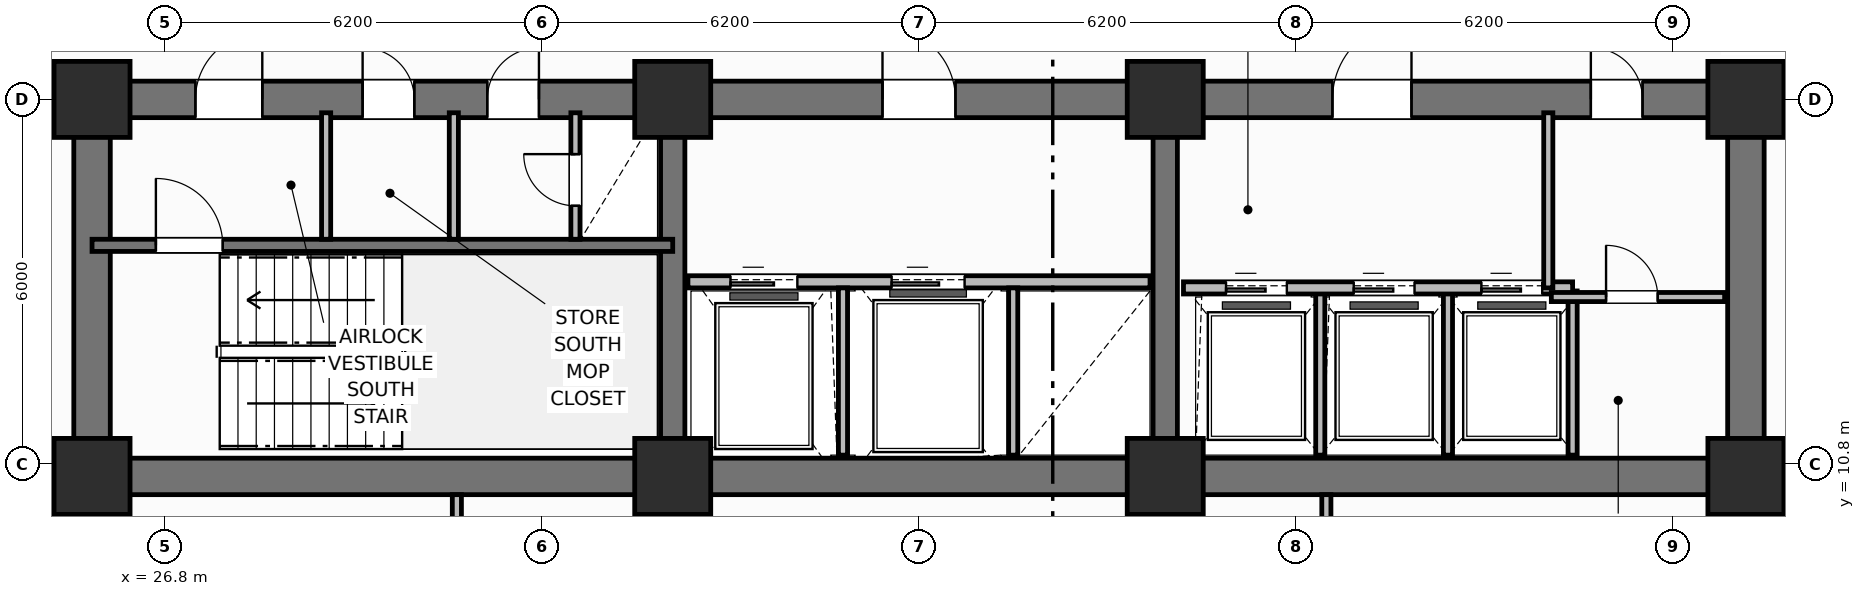
"""IFC4 building model, lengths in metres.
Left out: names, types, materials, properties, quantities, classifications, styles, units other than length and angle.
Written with IfcOpenShell. Run it as: python <this file> out.ifc"""

import sys

from ifc_helpers import new_model, si_unit, direction, frame, frame_2d, origin, origin_2d, place, context, subcontext, project, spatial, rectangle, extrude, element, fill, save


model = new_model("IFC4")
c1 = context("Model", 3, precision=1e-05, world=origin(), true_north=direction((0.0, 1.0)))
c2 = subcontext(c1, "Body", "Model", "MODEL_VIEW")
j1 = project(units=[si_unit("LENGTHUNIT", "METRE"), si_unit("PLANEANGLEUNIT", "RADIAN")], contexts=[c1])
p1 = place(None, origin())
s1 = spatial("IfcSite", under=j1, at=p1, CompositionType="ELEMENT")
p2 = place(p1, origin())
s2 = spatial("IfcBuilding", under=s1, at=p2, CompositionType="ELEMENT")
p3 = place(p2, frame((0.0, 0.0, 69.5)))
s3 = spatial("IfcBuildingStorey", under=s2, at=p3, CompositionType="ELEMENT", Elevation=69.5)
p4 = place(p3, frame((52.8, 10.6, 0.0), z_axis=(0.0, 0.0, 1.0), x_axis=(-1.0, 0.0, 0.0)))
e1 = element("IfcWall", 1, at=p4, inside=s3, PredefinedType="SHEAR", context=c2, shape_type="SweptSolid", body=[
    extrude(rectangle(XDim=27.2, YDim=0.6, at=frame_2d((13.6, 0.0))), origin(), (0.0, 0.0, 1.0), 3.7),
])
for number, where, z_axis, x_axis in (
    (2, (25.6, 10.9, 0.0), (0.0, 0.0, 1.0), (0.0, 1.0, 0.0)),
    (3, (52.8, 10.9, 0.0), (0.0, 0.0, 1.0), (0.0, 1.0, 0.0)),
):
    element("IfcWall", number, at=place(p3, frame(where, z_axis=z_axis, x_axis=x_axis)), inside=s3, PredefinedType="SHEAR", context=c2, shape_type="SweptSolid", body=[
        extrude(rectangle(XDim=5.6, YDim=0.6, at=frame_2d((2.8, 0.0))), origin(), (0.0, 0.0, 1.0), 3.7),
    ])
p5 = place(p3, frame((25.6, 16.8, 0.0), z_axis=(0.0, 0.0, 1.0), x_axis=(1.0, 0.0, 0.0)))
e4 = element("IfcWall", 4, at=p5, inside=s3, PredefinedType="SHEAR", context=c2, shape_type="SweptSolid", body=[
    extrude(rectangle(XDim=27.2, YDim=0.6, at=frame_2d((13.6, 0.0))), origin(), (0.0, 0.0, 1.0), 3.7),
])
p6 = place(p5, frame((1.7, 0.0, 0.0)))
e5 = element("IfcOpeningElement", 5, at=p6, cuts=e4, PredefinedType="OPENING", context=c2, shape_type="SweptSolid", body=[
    extrude(rectangle(XDim=1.1, YDim=2.15, at=frame_2d((0.55, 1.075))), frame((0.0, 0.31, 0.0), z_axis=(0.0, -1.0, 0.0), x_axis=(1.0, 0.0, 0.0)), (0.0, 0.0, 1.0), 0.62),
])
p7 = place(p5, frame((4.45, 0.0, 0.0)))
e6 = element("IfcOpeningElement", 6, at=p7, cuts=e4, PredefinedType="OPENING", context=c2, shape_type="SweptSolid", body=[
    extrude(rectangle(XDim=0.85, YDim=2.1, at=frame_2d((0.425, 1.05))), frame((0.0, 0.31, 0.0), z_axis=(0.0, -1.0, 0.0), x_axis=(1.0, 0.0, 0.0)), (0.0, 0.0, 1.0), 0.62),
])
p8 = place(p5, frame((6.5, 0.0, 0.0)))
e7 = element("IfcOpeningElement", 7, at=p8, cuts=e4, PredefinedType="OPENING", context=c2, shape_type="SweptSolid", body=[
    extrude(rectangle(XDim=0.85, YDim=2.1, at=frame_2d((0.425, 1.05))), frame((0.0, 0.31, 0.0), z_axis=(0.0, -1.0, 0.0), x_axis=(1.0, 0.0, 0.0)), (0.0, 0.0, 1.0), 0.62),
])
p9 = place(p5, frame((13.0, 0.0, 0.0)))
e8 = element("IfcOpeningElement", 8, at=p9, cuts=e4, PredefinedType="OPENING", context=c2, shape_type="SweptSolid", body=[
    extrude(rectangle(XDim=1.2, YDim=2.15, at=frame_2d((0.6, 1.075))), frame((0.0, 0.31, 0.0), z_axis=(0.0, -1.0, 0.0), x_axis=(1.0, 0.0, 0.0)), (0.0, 0.0, 1.0), 0.62),
])
p10 = place(p5, frame((20.4, 0.0, 0.0)))
e9 = element("IfcOpeningElement", 9, at=p10, cuts=e4, PredefinedType="OPENING", context=c2, shape_type="SweptSolid", body=[
    extrude(rectangle(XDim=1.3, YDim=2.2, at=frame_2d((0.65, 1.1))), frame((0.0, 0.31, 0.0), z_axis=(0.0, -1.0, 0.0), x_axis=(1.0, 0.0, 0.0)), (0.0, 0.0, 1.0), 0.62),
])
p11 = place(p5, frame((24.65, 0.0, 0.0)))
e10 = element("IfcOpeningElement", 10, at=p11, cuts=e4, PredefinedType="OPENING", context=c2, shape_type="SweptSolid", body=[
    extrude(rectangle(XDim=0.85, YDim=2.1, at=frame_2d((0.425, 1.05))), frame((0.0, 0.31, 0.0), z_axis=(0.0, -1.0, 0.0), x_axis=(1.0, 0.0, 0.0)), (0.0, 0.0, 1.0), 0.62),
])
for number, where, z_axis, x_axis in (
    (11, (35.15, 10.9, 0.0), (0.0, 0.0, 1.0), (0.0, 1.0, 0.0)),
    (12, (43.25, 10.9, 0.0), (0.0, 0.0, 1.0), (0.0, 1.0, 0.0)),
):
    element("IfcWall", number, at=place(p3, frame(where, z_axis=z_axis, x_axis=x_axis)), inside=s3, PredefinedType="SHEAR", context=c2, shape_type="SweptSolid", body=[
        extrude(rectangle(XDim=5.6, YDim=0.4, at=frame_2d((2.8, 0.0))), origin(), (0.0, 0.0, 1.0), 3.7),
    ])
for number, where, z_axis, x_axis in (
    (13, (25.6, 10.6, 0.0), (0.0, 0.0, 1.0), (1.0, 0.0, 0.0)),
    (14, (25.6, 16.8, 0.0), (0.0, 0.0, 1.0), (1.0, 0.0, 0.0)),
    (15, (35.15, 10.6, 0.0), (0.0, 0.0, 1.0), (1.0, 0.0, 0.0)),
    (16, (35.15, 16.8, 0.0), (0.0, 0.0, 1.0), (1.0, 0.0, 0.0)),
    (17, (43.25, 10.6, 0.0), (0.0, 0.0, 1.0), (1.0, 0.0, 0.0)),
    (18, (43.25, 16.8, 0.0), (0.0, 0.0, 1.0), (1.0, 0.0, 0.0)),
    (19, (52.8, 10.6, 0.0), (0.0, 0.0, 1.0), (1.0, 0.0, 0.0)),
    (20, (52.8, 16.8, 0.0), (0.0, 0.0, 1.0), (1.0, 0.0, 0.0)),
):
    element("IfcColumn", number, at=place(p3, frame(where, z_axis=z_axis, x_axis=x_axis)), inside=s3, PredefinedType="COLUMN", context=c2, shape_type="SweptSolid", body=[
        extrude(rectangle(XDim=1.25, YDim=1.25, at=origin_2d()), origin(), (0.0, 0.0, 1.0), 3.7),
    ])
p12 = place(p3, frame((25.6, 14.4, 0.0), z_axis=(0.0, 0.0, 1.0), x_axis=(1.0, 0.0, 0.0)))
e21 = element("IfcWall", 21, at=p12, inside=s3, PredefinedType="SHEAR", context=c2, shape_type="SweptSolid", body=[
    extrude(rectangle(XDim=9.55, YDim=0.2, at=frame_2d((4.775, 0.0))), origin(), (0.0, 0.0, 1.0), 3.7),
])
p13 = place(p12, frame((1.05, 0.0, 0.0)))
e22 = element("IfcOpeningElement", 22, at=p13, cuts=e21, PredefinedType="OPENING", context=c2, shape_type="SweptSolid", body=[
    extrude(rectangle(XDim=1.1, YDim=2.15, at=frame_2d((0.55, 1.075))), frame((0.0, 0.11, 0.0), z_axis=(0.0, -1.0, 0.0), x_axis=(1.0, 0.0, 0.0)), (0.0, 0.0, 1.0), 0.22),
])
for number, where, z_axis, x_axis in (
    (23, (29.45, 14.5, 0.0), (0.0, 0.0, 1.0), (0.0, 1.0, 0.0)),
    (24, (31.55, 14.5, 0.0), (0.0, 0.0, 1.0), (0.0, 1.0, 0.0)),
):
    element("IfcWall", number, at=place(p3, frame(where, z_axis=z_axis, x_axis=x_axis)), inside=s3, PredefinedType="PARTITIONING", context=c2, shape_type="SweptSolid", body=[
        extrude(rectangle(XDim=2.08, YDim=0.15, at=frame_2d((1.04, 0.0))), origin(), (0.0, 0.0, 1.0), 2.53),
    ])
p14 = place(p3, frame((33.55, 14.5, 0.0), z_axis=(0.0, 0.0, 1.0), x_axis=(0.0, 1.0, 0.0)))
e25 = element("IfcWall", 25, at=p14, inside=s3, PredefinedType="PARTITIONING", context=c2, shape_type="SweptSolid", body=[
    extrude(rectangle(XDim=2.08, YDim=0.15, at=frame_2d((1.04, 0.0))), origin(), (0.0, 0.0, 1.0), 2.53),
])
p15 = place(p14, frame((0.55, 0.0, 0.0)))
e26 = element("IfcOpeningElement", 26, at=p15, cuts=e25, PredefinedType="OPENING", context=c2, shape_type="SweptSolid", body=[
    extrude(rectangle(XDim=0.85, YDim=2.05, at=frame_2d((0.425, 1.025))), frame((0.0, 0.085, 0.0), z_axis=(0.0, -1.0, 0.0), x_axis=(1.0, 0.0, 0.0)), (0.0, 0.0, 1.0), 0.17),
])
p16 = place(p3, frame((35.4, 13.8, 0.0), z_axis=(0.0, 0.0, 1.0), x_axis=(1.0, 0.0, 0.0)))
e27 = element("IfcWall", 27, at=p16, inside=s3, PredefinedType="PARTITIONING", context=c2, shape_type="SweptSolid", body=[
    extrude(rectangle(XDim=7.6, YDim=0.2, at=frame_2d((3.8, 0.0))), origin(), (0.0, 0.0, 1.0), 2.3),
])
p17 = place(p16, frame((0.7, 0.0, 0.0)))
e28 = element("IfcOpeningElement", 28, at=p17, cuts=e27, PredefinedType="OPENING", context=c2, shape_type="SweptSolid", body=[
    extrude(rectangle(XDim=1.1, YDim=2.15, at=frame_2d((0.55, 1.075))), frame((0.0, 0.11, 0.0), z_axis=(0.0, -1.0, 0.0), x_axis=(1.0, 0.0, 0.0)), (0.0, 0.0, 1.0), 0.22),
])
p18 = place(p16, frame((3.35, 0.0, 0.0)))
e29 = element("IfcOpeningElement", 29, at=p18, cuts=e27, PredefinedType="OPENING", context=c2, shape_type="SweptSolid", body=[
    extrude(rectangle(XDim=1.2, YDim=2.15, at=frame_2d((0.6, 1.075))), frame((0.0, 0.11, 0.0), z_axis=(0.0, -1.0, 0.0), x_axis=(1.0, 0.0, 0.0)), (0.0, 0.0, 1.0), 0.22),
])
for number, where, z_axis, x_axis in (
    (30, (37.95, 10.95, 0.0), (0.0, 0.0, 1.0), (0.0, 1.0, 0.0)),
    (31, (40.75, 10.95, 0.0), (0.0, 0.0, 1.0), (0.0, 1.0, 0.0)),
):
    element("IfcWall", number, at=place(p3, frame(where, z_axis=z_axis, x_axis=x_axis)), inside=s3, PredefinedType="PARTITIONING", context=c2, shape_type="SweptSolid", body=[
        extrude(rectangle(XDim=2.75, YDim=0.15, at=frame_2d((1.375, 0.0))), origin(), (0.0, 0.0, 1.0), 2.53),
    ])
for number, where, z_axis, x_axis in (
    (32, (45.8, 10.95, 0.0), (0.0, 0.0, 1.0), (0.0, 1.0, 0.0)),
    (33, (47.9, 10.95, 0.0), (0.0, 0.0, 1.0), (0.0, 1.0, 0.0)),
    (34, (49.95, 10.95, 0.0), (0.0, 0.0, 1.0), (0.0, 1.0, 0.0)),
):
    element("IfcWall", number, at=place(p3, frame(where, z_axis=z_axis, x_axis=x_axis)), inside=s3, PredefinedType="PARTITIONING", context=c2, shape_type="SweptSolid", body=[
        extrude(rectangle(XDim=2.7, YDim=0.15, at=frame_2d((1.35, 0.0))), origin(), (0.0, 0.0, 1.0), 2.53),
    ])
p19 = place(p3, frame((43.55, 13.7, 0.0), z_axis=(0.0, 0.0, 1.0), x_axis=(1.0, 0.0, 0.0)))
e35 = element("IfcWall", 35, at=p19, inside=s3, PredefinedType="PARTITIONING", context=c2, shape_type="SweptSolid", body=[
    extrude(rectangle(XDim=6.4, YDim=0.2, at=frame_2d((3.2, 0.0))), origin(), (0.0, 0.0, 1.0), 2.53),
])
p20 = place(p19, frame((0.7, 0.0, 0.0)))
e36 = element("IfcOpeningElement", 36, at=p20, cuts=e35, PredefinedType="OPENING", context=c2, shape_type="SweptSolid", body=[
    extrude(rectangle(XDim=1.0, YDim=2.15, at=frame_2d((0.5, 1.075))), frame((0.0, 0.11, 0.0), z_axis=(0.0, -1.0, 0.0), x_axis=(1.0, 0.0, 0.0)), (0.0, 0.0, 1.0), 0.22),
])
p21 = place(p19, frame((2.8, 0.0, 0.0)))
e37 = element("IfcOpeningElement", 37, at=p21, cuts=e35, PredefinedType="OPENING", context=c2, shape_type="SweptSolid", body=[
    extrude(rectangle(XDim=1.0, YDim=2.15, at=frame_2d((0.5, 1.075))), frame((0.0, 0.11, 0.0), z_axis=(0.0, -1.0, 0.0), x_axis=(1.0, 0.0, 0.0)), (0.0, 0.0, 1.0), 0.22),
])
p22 = place(p19, frame((4.9, 0.0, 0.0)))
e38 = element("IfcOpeningElement", 38, at=p22, cuts=e35, PredefinedType="OPENING", context=c2, shape_type="SweptSolid", body=[
    extrude(rectangle(XDim=1.0, YDim=2.15, at=frame_2d((0.5, 1.075))), frame((0.0, 0.11, 0.0), z_axis=(0.0, -1.0, 0.0), x_axis=(1.0, 0.0, 0.0)), (0.0, 0.0, 1.0), 0.22),
])
p23 = place(p3, frame((49.55, 13.7, 0.0), z_axis=(0.0, 0.0, 1.0), x_axis=(0.0, 1.0, 0.0)))
e39 = element("IfcWall", 39, at=p23, inside=s3, PredefinedType="PARTITIONING", context=c2, shape_type="SweptSolid", body=[
    extrude(rectangle(XDim=2.88, YDim=0.15, at=frame_2d((1.44, 0.0))), origin(), (0.0, 0.0, 1.0), 2.53),
])
p24 = place(p3, frame((49.6, 13.55, 0.0), z_axis=(0.0, 0.0, 1.0), x_axis=(1.0, 0.0, 0.0)))
e40 = element("IfcWall", 40, at=p24, inside=s3, PredefinedType="PARTITIONING", context=c2, shape_type="SweptSolid", body=[
    extrude(rectangle(XDim=2.85, YDim=0.15, at=frame_2d((1.425, 0.0))), origin(), (0.0, 0.0, 1.0), 2.53),
])
p25 = place(p24, frame((0.9, 0.0, 0.0)))
e41 = element("IfcOpeningElement", 41, at=p25, cuts=e40, PredefinedType="OPENING", context=c2, shape_type="SweptSolid", body=[
    extrude(rectangle(XDim=0.85, YDim=2.1, at=frame_2d((0.425, 1.05))), frame((0.0, 0.085, 0.0), z_axis=(0.0, -1.0, 0.0), x_axis=(1.0, 0.0, 0.0)), (0.0, 0.0, 1.0), 0.17),
])
p26 = place(p3, frame((31.6, 4.97, 0.0), z_axis=(0.0, 0.0, 1.0), x_axis=(0.0, 1.0, 0.0)))
e42 = element("IfcWall", 42, at=p26, inside=s3, PredefinedType="PARTITIONING", context=c2, shape_type="SweptSolid", body=[
    extrude(rectangle(XDim=5.33, YDim=0.15, at=frame_2d((2.665, 0.0))), origin(), (0.0, 0.0, 1.0), 2.53),
])
p27 = place(p26, frame((1.8, 0.0, 0.0)))
e43 = element("IfcOpeningElement", 43, at=p27, cuts=e42, PredefinedType="OPENING", context=c2, shape_type="SweptSolid", body=[
    extrude(rectangle(XDim=0.9, YDim=2.1, at=frame_2d((0.45, 1.05))), frame((0.0, 0.085, 0.0), z_axis=(0.0, -1.0, 0.0), x_axis=(1.0, 0.0, 0.0)), (0.0, 0.0, 1.0), 0.17),
])
p28 = place(p3, frame((45.9, 4.97, 0.0), z_axis=(0.0, 0.0, 1.0), x_axis=(0.0, 1.0, 0.0)))
e44 = element("IfcWall", 44, at=p28, inside=s3, PredefinedType="PARTITIONING", context=c2, shape_type="SweptSolid", body=[
    extrude(rectangle(XDim=5.33, YDim=0.15, at=frame_2d((2.665, 0.0))), origin(), (0.0, 0.0, 1.0), 2.53),
])
p29 = place(p3, frame((25.4, 6.12, 0.0), z_axis=(0.0, 0.0, 1.0), x_axis=(0.0, 1.0, 0.0)))
e45 = element("IfcWall", 45, at=p29, inside=s3, PredefinedType="PARTITIONING", context=c2, shape_type="SweptSolid", body=[
    extrude(rectangle(XDim=4.18, YDim=0.2, at=frame_2d((2.09, 0.0))), origin(), (0.0, 0.0, 1.0), 2.53),
])
p30 = place(p29, frame((0.65, 0.0, 0.0)))
e46 = element("IfcOpeningElement", 46, at=p30, cuts=e45, PredefinedType="OPENING", context=c2, shape_type="SweptSolid", body=[
    extrude(rectangle(XDim=0.9, YDim=2.1, at=frame_2d((0.45, 1.05))), frame((0.0, 0.11, 0.0), z_axis=(0.0, -1.0, 0.0), x_axis=(1.0, 0.0, 0.0)), (0.0, 0.0, 1.0), 0.22),
])
p31 = place(p3, frame((53.0, 6.12, 0.0), z_axis=(0.0, 0.0, 1.0), x_axis=(0.0, 1.0, 0.0)))
e47 = element("IfcWall", 47, at=p31, inside=s3, PredefinedType="PARTITIONING", context=c2, shape_type="SweptSolid", body=[
    extrude(rectangle(XDim=4.18, YDim=0.2, at=frame_2d((2.09, 0.0))), origin(), (0.0, 0.0, 1.0), 2.53),
])
p32 = place(p31, frame((0.65, 0.0, 0.0)))
e48 = element("IfcOpeningElement", 48, at=p32, cuts=e47, PredefinedType="OPENING", context=c2, shape_type="SweptSolid", body=[
    extrude(rectangle(XDim=0.9, YDim=2.1, at=frame_2d((0.45, 1.05))), frame((0.0, 0.11, 0.0), z_axis=(0.0, -1.0, 0.0), x_axis=(1.0, 0.0, 0.0)), (0.0, 0.0, 1.0), 0.22),
])
p33 = place(p13, origin())
e49 = element("IfcDoor", 49, at=p33, inside=s3, OperationType="SINGLE_SWING_LEFT", PredefinedType="DOOR", context=c2, shape_type="SweptSolid", body=[
    extrude(rectangle(XDim=1.1, YDim=2.15, at=frame_2d((0.55, 1.075))), frame((0.0, 0.025, 0.0), z_axis=(0.0, -1.0, 0.0), x_axis=(1.0, 0.0, 0.0)), (0.0, 0.0, 1.0), 0.05),
])
fill(e22, e49)
p34 = place(p15, origin())
e50 = element("IfcDoor", 50, at=p34, inside=s3, OperationType="SINGLE_SWING_RIGHT", PredefinedType="TRAPDOOR", context=c2, shape_type="SweptSolid", body=[
    extrude(rectangle(XDim=0.85, YDim=2.05, at=frame_2d((0.425, 1.025))), frame((0.0, 0.025, 0.0), z_axis=(0.0, -1.0, 0.0), x_axis=(1.0, 0.0, 0.0)), (0.0, 0.0, 1.0), 0.05),
])
fill(e26, e50)
p35 = place(p17, origin())
e51 = element("IfcDoor", 51, at=p35, inside=s3, OperationType="SLIDING_TO_LEFT", PredefinedType="DOOR", context=c2, shape_type="SweptSolid", body=[
    extrude(rectangle(XDim=1.1, YDim=2.15, at=frame_2d((0.55, 1.075))), frame((0.0, 0.025, 0.0), z_axis=(0.0, -1.0, 0.0), x_axis=(1.0, 0.0, 0.0)), (0.0, 0.0, 1.0), 0.05),
])
fill(e28, e51)
p36 = place(p18, origin())
e52 = element("IfcDoor", 52, at=p36, inside=s3, OperationType="SLIDING_TO_LEFT", PredefinedType="DOOR", context=c2, shape_type="SweptSolid", body=[
    extrude(rectangle(XDim=1.2, YDim=2.15, at=frame_2d((0.6, 1.075))), frame((0.0, 0.025, 0.0), z_axis=(0.0, -1.0, 0.0), x_axis=(1.0, 0.0, 0.0)), (0.0, 0.0, 1.0), 0.05),
])
fill(e29, e52)
p37 = place(p20, origin())
e53 = element("IfcDoor", 53, at=p37, inside=s3, OperationType="SLIDING_TO_LEFT", PredefinedType="DOOR", context=c2, shape_type="SweptSolid", body=[
    extrude(rectangle(XDim=1.0, YDim=2.15, at=frame_2d((0.5, 1.075))), frame((0.0, 0.025, 0.0), z_axis=(0.0, -1.0, 0.0), x_axis=(1.0, 0.0, 0.0)), (0.0, 0.0, 1.0), 0.05),
])
fill(e36, e53)
p38 = place(p21, origin())
e54 = element("IfcDoor", 54, at=p38, inside=s3, OperationType="SLIDING_TO_LEFT", PredefinedType="DOOR", context=c2, shape_type="SweptSolid", body=[
    extrude(rectangle(XDim=1.0, YDim=2.15, at=frame_2d((0.5, 1.075))), frame((0.0, 0.025, 0.0), z_axis=(0.0, -1.0, 0.0), x_axis=(1.0, 0.0, 0.0)), (0.0, 0.0, 1.0), 0.05),
])
fill(e37, e54)
p39 = place(p22, origin())
e55 = element("IfcDoor", 55, at=p39, inside=s3, OperationType="SLIDING_TO_LEFT", PredefinedType="DOOR", context=c2, shape_type="SweptSolid", body=[
    extrude(rectangle(XDim=1.0, YDim=2.15, at=frame_2d((0.5, 1.075))), frame((0.0, 0.025, 0.0), z_axis=(0.0, -1.0, 0.0), x_axis=(1.0, 0.0, 0.0)), (0.0, 0.0, 1.0), 0.05),
])
fill(e38, e55)
p40 = place(p25, origin())
e56 = element("IfcDoor", 56, at=p40, inside=s3, OperationType="SINGLE_SWING_LEFT", PredefinedType="DOOR", context=c2, shape_type="SweptSolid", body=[
    extrude(rectangle(XDim=0.85, YDim=2.1, at=frame_2d((0.425, 1.05))), frame((0.0, 0.025, 0.0), z_axis=(0.0, -1.0, 0.0), x_axis=(1.0, 0.0, 0.0)), (0.0, 0.0, 1.0), 0.05),
])
fill(e41, e56)
p41 = place(p6, origin())
e57 = element("IfcDoor", 57, at=p41, inside=s3, OperationType="SINGLE_SWING_RIGHT", PredefinedType="DOOR", context=c2, shape_type="SweptSolid", body=[
    extrude(rectangle(XDim=1.1, YDim=2.15, at=frame_2d((0.55, 1.075))), frame((0.0, 0.025, 0.0), z_axis=(0.0, -1.0, 0.0), x_axis=(1.0, 0.0, 0.0)), (0.0, 0.0, 1.0), 0.05),
])
fill(e5, e57)
p42 = place(p7, origin())
e58 = element("IfcDoor", 58, at=p42, inside=s3, OperationType="SINGLE_SWING_LEFT", PredefinedType="DOOR", context=c2, shape_type="SweptSolid", body=[
    extrude(rectangle(XDim=0.85, YDim=2.1, at=frame_2d((0.425, 1.05))), frame((0.0, 0.025, 0.0), z_axis=(0.0, -1.0, 0.0), x_axis=(1.0, 0.0, 0.0)), (0.0, 0.0, 1.0), 0.05),
])
fill(e6, e58)
p43 = place(p8, origin())
e59 = element("IfcDoor", 59, at=p43, inside=s3, OperationType="SINGLE_SWING_RIGHT", PredefinedType="DOOR", context=c2, shape_type="SweptSolid", body=[
    extrude(rectangle(XDim=0.85, YDim=2.1, at=frame_2d((0.425, 1.05))), frame((0.0, 0.025, 0.0), z_axis=(0.0, -1.0, 0.0), x_axis=(1.0, 0.0, 0.0)), (0.0, 0.0, 1.0), 0.05),
])
fill(e7, e59)
p44 = place(p9, origin())
e60 = element("IfcDoor", 60, at=p44, inside=s3, OperationType="SINGLE_SWING_LEFT", PredefinedType="DOOR", context=c2, shape_type="SweptSolid", body=[
    extrude(rectangle(XDim=1.2, YDim=2.15, at=frame_2d((0.6, 1.075))), frame((0.0, 0.025, 0.0), z_axis=(0.0, -1.0, 0.0), x_axis=(1.0, 0.0, 0.0)), (0.0, 0.0, 1.0), 0.05),
])
fill(e8, e60)
p45 = place(p10, origin())
e61 = element("IfcDoor", 61, at=p45, inside=s3, OperationType="SINGLE_SWING_RIGHT", PredefinedType="DOOR", context=c2, shape_type="SweptSolid", body=[
    extrude(rectangle(XDim=1.3, YDim=2.2, at=frame_2d((0.65, 1.1))), frame((0.0, 0.025, 0.0), z_axis=(0.0, -1.0, 0.0), x_axis=(1.0, 0.0, 0.0)), (0.0, 0.0, 1.0), 0.05),
])
fill(e9, e61)
p46 = place(p11, origin())
e62 = element("IfcDoor", 62, at=p46, inside=s3, OperationType="SINGLE_SWING_LEFT", PredefinedType="DOOR", context=c2, shape_type="SweptSolid", body=[
    extrude(rectangle(XDim=0.85, YDim=2.1, at=frame_2d((0.425, 1.05))), frame((0.0, 0.025, 0.0), z_axis=(0.0, -1.0, 0.0), x_axis=(1.0, 0.0, 0.0)), (0.0, 0.0, 1.0), 0.05),
])
fill(e10, e62)
save(model, sys.argv[1])
